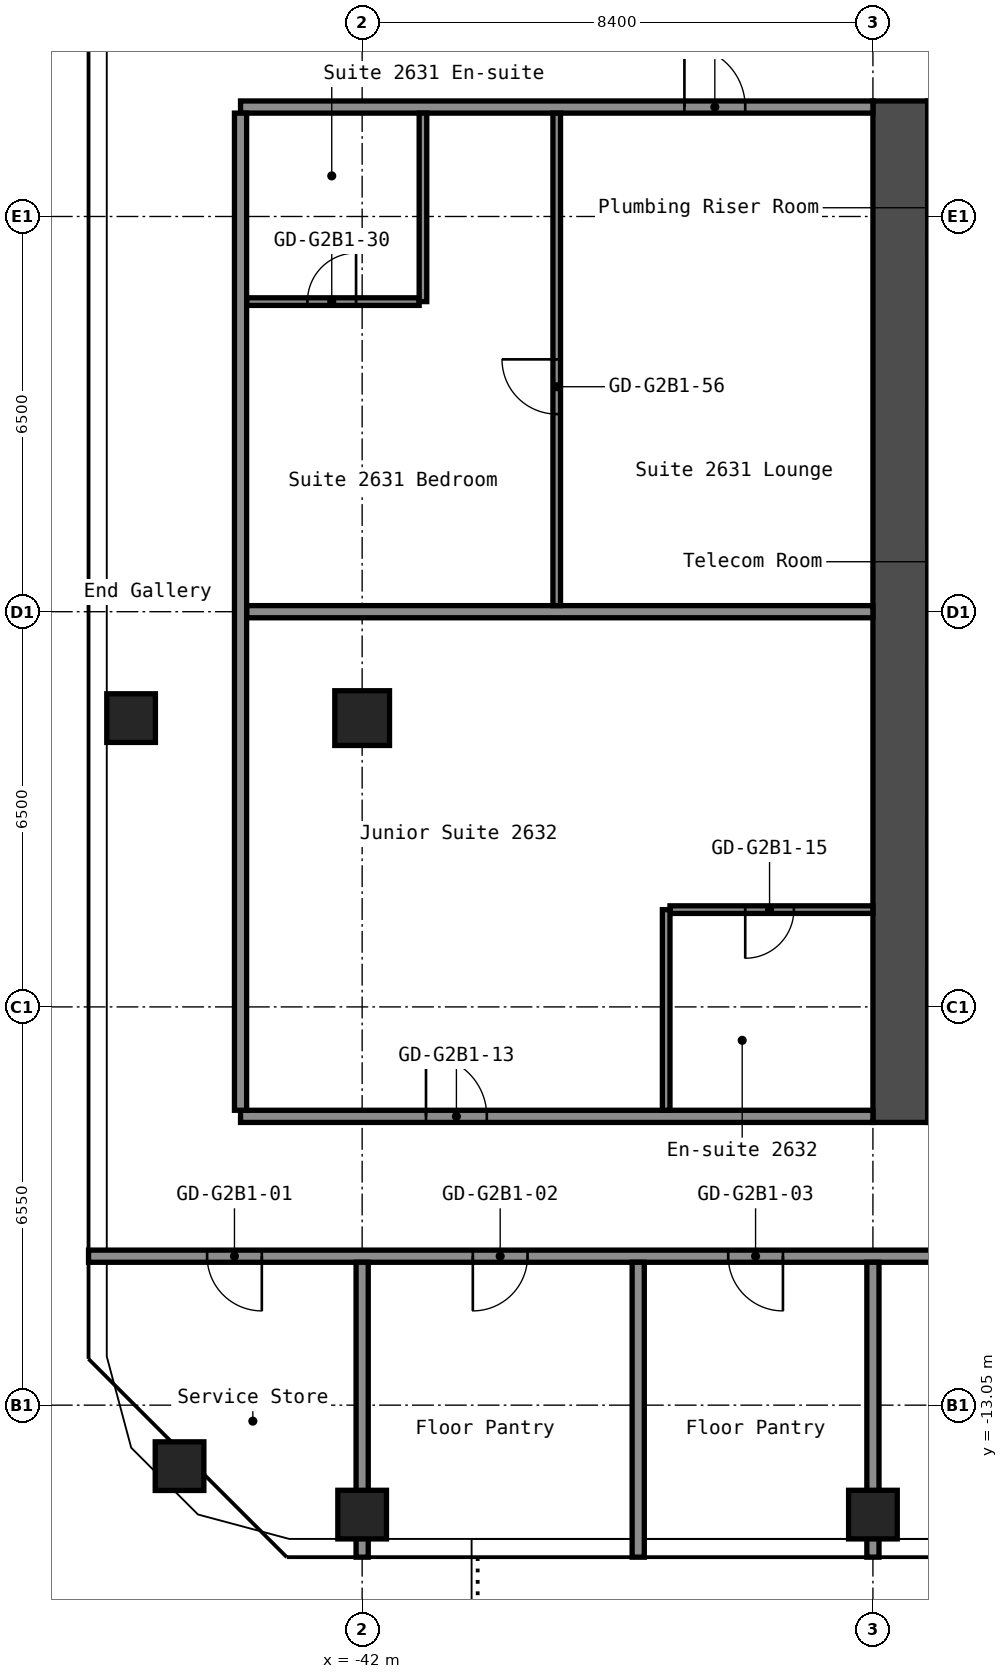
"""IFC4 building model, lengths in metres.
Left out: names, types, materials, properties, quantities, classifications, styles, units other than length and angle.
Written with IfcOpenShell. Run it as: python <this file> out.ifc"""

import sys

from ifc_helpers import new_model, si_unit, direction, frame, frame_2d, origin, origin_2d, place, context, subcontext, project, spatial, rectangle, hollow_rectangle, extrude, element, fill, save


model = new_model("IFC4")
c1 = context("Model", 3, precision=1e-05, world=origin(), true_north=direction((0.0, 1.0)))
c2 = subcontext(c1, "Body", "Model", "MODEL_VIEW")
j1 = project(units=[si_unit("LENGTHUNIT", "METRE"), si_unit("PLANEANGLEUNIT", "RADIAN")], contexts=[c1])
p1 = place(None, origin())
s1 = spatial("IfcSite", under=j1, at=p1, CompositionType="ELEMENT")
p2 = place(p1, origin())
s2 = spatial("IfcBuilding", under=s1, at=p2, CompositionType="ELEMENT")
p3 = place(p2, frame((0.0, 0.0, 94.6)))
s3 = spatial("IfcBuildingStorey", under=s2, at=p3, CompositionType="ELEMENT", Elevation=94.6)
for number, where, z_axis, x_axis in (
    (1, (-45.003, -14.053, 0.0), (0.0, 0.0, 1.0), (1.0, 0.0, 0.0)),
    (2, (-45.8, -1.75, 0.0), (0.0, 0.0, 1.0), (1.0, 0.0, 0.0)),
    (3, (-42.0, -14.85, 0.0), (0.0, 0.0, 1.0), (1.0, 0.0, 0.0)),
):
    element("IfcColumn", number, at=place(p3, frame(where, z_axis=z_axis, x_axis=x_axis)), inside=s3, PredefinedType="COLUMN", context=c2, shape_type="SweptSolid", body=[
        extrude(hollow_rectangle(XDim=0.8, YDim=0.8, WallThickness=0.032, at=origin_2d()), origin(), (0.0, 0.0, 1.0), 2.8),
    ])
p4 = place(p3, frame((-42.0, -1.75, 0.0), z_axis=(0.0, 0.0, 1.0), x_axis=(1.0, 0.0, 0.0)))
e4 = element("IfcColumn", 4, at=p4, inside=s3, PredefinedType="COLUMN", context=c2, shape_type="SweptSolid", body=[
    extrude(hollow_rectangle(XDim=0.9, YDim=0.9, WallThickness=0.036, at=origin_2d()), origin(), (0.0, 0.0, 1.0), 2.8),
])
p5 = place(p3, frame((-33.6, -14.85, 0.0), z_axis=(0.0, 0.0, 1.0), x_axis=(1.0, 0.0, 0.0)))
e5 = element("IfcColumn", 5, at=p5, inside=s3, PredefinedType="COLUMN", context=c2, shape_type="SweptSolid", body=[
    extrude(hollow_rectangle(XDim=0.8, YDim=0.8, WallThickness=0.032, at=origin_2d()), origin(), (0.0, 0.0, 1.0), 2.8),
])
p6 = place(p3, frame((-33.15, -8.4, 0.0), z_axis=(0.0, 0.0, 1.0), x_axis=(0.0, 1.0, 0.0)))
e6 = element("IfcWall", 6, at=p6, inside=s3, PredefinedType="SHEAR", context=c2, shape_type="SweptSolid", body=[
    extrude(rectangle(XDim=16.8, YDim=0.9, at=frame_2d((8.4, 0.0))), origin(), (0.0, 0.0, 1.0), 2.8),
])
p7 = place(p3, frame((-32.7, 1.325, 0.0), z_axis=(0.0, 0.0, 1.0), x_axis=(1.0, 0.0, 0.0)))
e7 = element("IfcWall", 7, at=p7, inside=s3, PredefinedType="SHEAR", context=c2, shape_type="SweptSolid", body=[
    extrude(rectangle(XDim=5.05, YDim=0.25, at=frame_2d((2.525, 0.0))), origin(), (0.0, 0.0, 1.0), 2.8),
])
p8 = place(p7, frame((3.3, 0.0, 0.0)))
e8 = element("IfcOpeningElement", 8, at=p8, cuts=e7, PredefinedType="OPENING", context=c2, shape_type="SweptSolid", body=[
    extrude(rectangle(XDim=1.2, YDim=2.1, at=frame_2d((0.6, 1.05))), frame((0.0, 0.135, 0.0), z_axis=(0.0, -1.0, 0.0), x_axis=(1.0, 0.0, 0.0)), (0.0, 0.0, 1.0), 0.27),
])
p9 = place(p3, frame((-32.7, -3.625, 0.0), z_axis=(0.0, 0.0, 1.0), x_axis=(1.0, 0.0, 0.0)))
e9 = element("IfcWall", 9, at=p9, inside=s3, PredefinedType="SHEAR", context=c2, shape_type="SweptSolid", body=[
    extrude(rectangle(XDim=4.55, YDim=0.25, at=frame_2d((2.275, 0.0))), origin(), (0.0, 0.0, 1.0), 2.8),
])
p10 = place(p9, frame((2.85, 0.0, 0.0)))
e10 = element("IfcOpeningElement", 10, at=p10, cuts=e9, PredefinedType="OPENING", context=c2, shape_type="SweptSolid", body=[
    extrude(rectangle(XDim=1.1, YDim=2.1, at=frame_2d((0.55, 1.05))), frame((0.0, 0.135, 0.0), z_axis=(0.0, -1.0, 0.0), x_axis=(1.0, 0.0, 0.0)), (0.0, 0.0, 1.0), 0.27),
])
p11 = place(p9, frame((0.6, 0.0, 0.0)))
e11 = element("IfcOpeningElement", 11, at=p11, cuts=e9, PredefinedType="OPENING", context=c2, shape_type="SweptSolid", body=[
    extrude(rectangle(XDim=1.1, YDim=2.1, at=frame_2d((0.55, 1.05))), frame((0.0, 0.135, 0.0), z_axis=(0.0, -1.0, 0.0), x_axis=(1.0, 0.0, 0.0)), (0.0, 0.0, 1.0), 0.27),
])
p12 = place(p3, frame((-32.7, -6.75, 0.0), z_axis=(0.0, 0.0, 1.0), x_axis=(1.0, 0.0, 0.0)))
e12 = element("IfcWall", 12, at=p12, inside=s3, PredefinedType="SHEAR", context=c2, shape_type="SweptSolid", body=[
    extrude(rectangle(XDim=4.55, YDim=1.5, at=frame_2d((2.275, 0.0))), origin(), (0.0, 0.0, 1.0), 2.8),
])
p13 = place(p3, frame((-46.5, -10.6, 0.0), z_axis=(0.0, 0.0, 1.0), x_axis=(1.0, 0.0, 0.0)))
e13 = element("IfcWall", 13, at=p13, inside=s3, PredefinedType="PARTITIONING", context=c2, shape_type="SweptSolid", body=[
    extrude(rectangle(XDim=29.7, YDim=0.2, at=frame_2d((14.85, 0.0))), origin(), (0.0, 0.0, 1.0), 2.8),
])
p14 = place(p13, frame((1.95, 0.0, 0.0)))
e14 = element("IfcOpeningElement", 14, at=p14, cuts=e13, PredefinedType="OPENING", context=c2, shape_type="SweptSolid", body=[
    extrude(rectangle(XDim=0.9, YDim=2.1, at=frame_2d((0.45, 1.05))), frame((0.0, 0.11, 0.0), z_axis=(0.0, -1.0, 0.0), x_axis=(1.0, 0.0, 0.0)), (0.0, 0.0, 1.0), 0.22),
])
p15 = place(p13, frame((6.32, 0.0, 0.0)))
e15 = element("IfcOpeningElement", 15, at=p15, cuts=e13, PredefinedType="OPENING", context=c2, shape_type="SweptSolid", body=[
    extrude(rectangle(XDim=0.9, YDim=2.1, at=frame_2d((0.45, 1.05))), frame((0.0, 0.11, 0.0), z_axis=(0.0, -1.0, 0.0), x_axis=(1.0, 0.0, 0.0)), (0.0, 0.0, 1.0), 0.22),
])
p16 = place(p13, frame((10.52, 0.0, 0.0)))
e16 = element("IfcOpeningElement", 16, at=p16, cuts=e13, PredefinedType="OPENING", context=c2, shape_type="SweptSolid", body=[
    extrude(rectangle(XDim=0.9, YDim=2.1, at=frame_2d((0.45, 1.05))), frame((0.0, 0.11, 0.0), z_axis=(0.0, -1.0, 0.0), x_axis=(1.0, 0.0, 0.0)), (0.0, 0.0, 1.0), 0.22),
])
p17 = place(p13, frame((16.6, 0.0, 0.0)))
e17 = element("IfcOpeningElement", 17, at=p17, cuts=e13, PredefinedType="OPENING", context=c2, shape_type="SweptSolid", body=[
    extrude(rectangle(XDim=1.0, YDim=2.1, at=frame_2d((0.5, 1.05))), frame((0.0, 0.11, 0.0), z_axis=(0.0, -1.0, 0.0), x_axis=(1.0, 0.0, 0.0)), (0.0, 0.0, 1.0), 0.22),
])
p18 = place(p13, frame((23.37, 0.0, 0.0)))
e18 = element("IfcOpeningElement", 18, at=p18, cuts=e13, PredefinedType="OPENING", context=c2, shape_type="SweptSolid", body=[
    extrude(rectangle(XDim=0.9, YDim=2.1, at=frame_2d((0.45, 1.05))), frame((0.0, 0.11, 0.0), z_axis=(0.0, -1.0, 0.0), x_axis=(1.0, 0.0, 0.0)), (0.0, 0.0, 1.0), 0.22),
])
p19 = place(p13, frame((27.57, 0.0, 0.0)))
e19 = element("IfcOpeningElement", 19, at=p19, cuts=e13, PredefinedType="OPENING", context=c2, shape_type="SweptSolid", body=[
    extrude(rectangle(XDim=0.9, YDim=2.1, at=frame_2d((0.45, 1.05))), frame((0.0, 0.11, 0.0), z_axis=(0.0, -1.0, 0.0), x_axis=(1.0, 0.0, 0.0)), (0.0, 0.0, 1.0), 0.22),
])
p20 = place(p3, frame((-44.0, -8.3, 0.0), z_axis=(0.0, 0.0, 1.0), x_axis=(1.0, 0.0, 0.0)))
e20 = element("IfcWall", 20, at=p20, inside=s3, PredefinedType="PARTITIONING", context=c2, shape_type="SweptSolid", body=[
    extrude(rectangle(XDim=10.4, YDim=0.2, at=frame_2d((5.2, 0.0))), origin(), (0.0, 0.0, 1.0), 2.8),
])
p21 = place(p20, frame((3.05, 0.0, 0.0)))
e21 = element("IfcOpeningElement", 21, at=p21, cuts=e20, PredefinedType="OPENING", context=c2, shape_type="SweptSolid", body=[
    extrude(rectangle(XDim=1.0, YDim=2.1, at=frame_2d((0.5, 1.05))), frame((0.0, 0.11, 0.0), z_axis=(0.0, -1.0, 0.0), x_axis=(1.0, 0.0, 0.0)), (0.0, 0.0, 1.0), 0.22),
])
p22 = place(p3, frame((-36.938, -4.9, 0.0), z_axis=(0.0, 0.0, 1.0), x_axis=(1.0, 0.0, 0.0)))
e22 = element("IfcWall", 22, at=p22, inside=s3, PredefinedType="PARTITIONING", context=c2, shape_type="SweptSolid", body=[
    extrude(rectangle(XDim=3.337, YDim=0.125, at=frame_2d((1.669, 0.0))), origin(), (0.0, 0.0, 1.0), 2.8),
])
p23 = place(p22, frame((1.238, 0.0, 0.0)))
e23 = element("IfcOpeningElement", 23, at=p23, cuts=e22, PredefinedType="OPENING", context=c2, shape_type="SweptSolid", body=[
    extrude(rectangle(XDim=0.8, YDim=2.1, at=frame_2d((0.4, 1.05))), frame((0.0, 0.073, 0.0), z_axis=(0.0, -1.0, 0.0), x_axis=(1.0, 0.0, 0.0)), (0.0, 0.0, 1.0), 0.145),
])
p24 = place(p3, frame((-43.9, 0.0, 0.0), z_axis=(0.0, 0.0, 1.0), x_axis=(1.0, 0.0, 0.0)))
e24 = element("IfcWall", 24, at=p24, inside=s3, PredefinedType="PARTITIONING", context=c2, shape_type="SweptSolid", body=[
    extrude(rectangle(XDim=10.3, YDim=0.2, at=frame_2d((5.15, 0.0))), origin(), (0.0, 0.0, 1.0), 2.8),
])
p25 = place(p3, frame((-43.9, 5.1, 0.0), z_axis=(0.0, 0.0, 1.0), x_axis=(1.0, 0.0, 0.0)))
e25 = element("IfcWall", 25, at=p25, inside=s3, PredefinedType="PARTITIONING", context=c2, shape_type="SweptSolid", body=[
    extrude(rectangle(XDim=2.837, YDim=0.125, at=frame_2d((1.419, 0.0))), origin(), (0.0, 0.0, 1.0), 2.8),
])
p26 = place(p25, frame((1.0, 0.0, 0.0)))
e26 = element("IfcOpeningElement", 26, at=p26, cuts=e25, PredefinedType="OPENING", context=c2, shape_type="SweptSolid", body=[
    extrude(rectangle(XDim=0.8, YDim=2.1, at=frame_2d((0.4, 1.05))), frame((0.0, 0.073, 0.0), z_axis=(0.0, -1.0, 0.0), x_axis=(1.0, 0.0, 0.0)), (0.0, 0.0, 1.0), 0.145),
])
p27 = place(p3, frame((-44.0, 8.3, 0.0), z_axis=(0.0, 0.0, 1.0), x_axis=(1.0, 0.0, 0.0)))
e27 = element("IfcWall", 27, at=p27, inside=s3, PredefinedType="PARTITIONING", context=c2, shape_type="SweptSolid", body=[
    extrude(rectangle(XDim=10.4, YDim=0.2, at=frame_2d((5.2, 0.0))), origin(), (0.0, 0.0, 1.0), 2.8),
])
p28 = place(p27, frame((7.3, 0.0, 0.0)))
e28 = element("IfcOpeningElement", 28, at=p28, cuts=e27, PredefinedType="OPENING", context=c2, shape_type="SweptSolid", body=[
    extrude(rectangle(XDim=1.0, YDim=2.1, at=frame_2d((0.5, 1.05))), frame((0.0, 0.11, 0.0), z_axis=(0.0, -1.0, 0.0), x_axis=(1.0, 0.0, 0.0)), (0.0, 0.0, 1.0), 0.22),
])
p29 = place(p3, frame((-44.0, -8.2, 0.0), z_axis=(0.0, 0.0, 1.0), x_axis=(0.0, 1.0, 0.0)))
e29 = element("IfcWall", 29, at=p29, inside=s3, PredefinedType="PARTITIONING", context=c2, shape_type="SweptSolid", body=[
    extrude(rectangle(XDim=16.4, YDim=0.2, at=frame_2d((8.2, 0.0))), origin(), (0.0, 0.0, 1.0), 2.8),
])
p30 = place(p3, frame((-42.0, -15.55, 0.0), z_axis=(0.0, 0.0, 1.0), x_axis=(0.0, 1.0, 0.0)))
e30 = element("IfcWall", 30, at=p30, inside=s3, PredefinedType="PARTITIONING", context=c2, shape_type="SweptSolid", body=[
    extrude(rectangle(XDim=4.85, YDim=0.2, at=frame_2d((2.425, 0.0))), origin(), (0.0, 0.0, 1.0), 2.8),
])
p31 = place(p3, frame((-41.0, 5.1, 0.0), z_axis=(0.0, 0.0, 1.0), x_axis=(0.0, 1.0, 0.0)))
e31 = element("IfcWall", 31, at=p31, inside=s3, PredefinedType="PARTITIONING", context=c2, shape_type="SweptSolid", body=[
    extrude(rectangle(XDim=3.1, YDim=0.125, at=frame_2d((1.55, 0.0))), origin(), (0.0, 0.0, 1.0), 2.8),
])
p32 = place(p3, frame((-38.8, 0.1, 0.0), z_axis=(0.0, 0.0, 1.0), x_axis=(0.0, 1.0, 0.0)))
e32 = element("IfcWall", 32, at=p32, inside=s3, PredefinedType="PARTITIONING", context=c2, shape_type="SweptSolid", body=[
    extrude(rectangle(XDim=8.1, YDim=0.125, at=frame_2d((4.05, 0.0))), origin(), (0.0, 0.0, 1.0), 2.8),
])
p33 = place(p32, frame((3.15, 0.0, 0.0)))
e33 = element("IfcOpeningElement", 33, at=p33, cuts=e32, PredefinedType="OPENING", context=c2, shape_type="SweptSolid", body=[
    extrude(rectangle(XDim=0.9, YDim=2.1, at=frame_2d((0.45, 1.05))), frame((0.0, 0.073, 0.0), z_axis=(0.0, -1.0, 0.0), x_axis=(1.0, 0.0, 0.0)), (0.0, 0.0, 1.0), 0.145),
])
p34 = place(p3, frame((-37.46, -15.55, 0.0), z_axis=(0.0, 0.0, 1.0), x_axis=(0.0, 1.0, 0.0)))
e34 = element("IfcWall", 34, at=p34, inside=s3, PredefinedType="PARTITIONING", context=c2, shape_type="SweptSolid", body=[
    extrude(rectangle(XDim=4.85, YDim=0.2, at=frame_2d((2.425, 0.0))), origin(), (0.0, 0.0, 1.0), 2.8),
])
p35 = place(p3, frame((-37.0, -8.2, 0.0), z_axis=(0.0, 0.0, 1.0), x_axis=(0.0, 1.0, 0.0)))
e35 = element("IfcWall", 35, at=p35, inside=s3, PredefinedType="PARTITIONING", context=c2, shape_type="SweptSolid", body=[
    extrude(rectangle(XDim=3.3, YDim=0.125, at=frame_2d((1.65, 0.0))), origin(), (0.0, 0.0, 1.0), 2.8),
])
p36 = place(p3, frame((-33.6, -15.55, 0.0), z_axis=(0.0, 0.0, 1.0), x_axis=(0.0, 1.0, 0.0)))
e36 = element("IfcWall", 36, at=p36, inside=s3, PredefinedType="PARTITIONING", context=c2, shape_type="SweptSolid", body=[
    extrude(rectangle(XDim=4.85, YDim=0.2, at=frame_2d((2.425, 0.0))), origin(), (0.0, 0.0, 1.0), 2.8),
])
p37 = place(p14, origin())
e37 = element("IfcDoor", 37, at=p37, inside=s3, OperationType="SINGLE_SWING_RIGHT", PredefinedType="DOOR", context=c2, shape_type="SweptSolid", body=[
    extrude(rectangle(XDim=0.9, YDim=2.1, at=frame_2d((0.45, 1.05))), frame((0.0, 0.025, 0.0), z_axis=(0.0, -1.0, 0.0), x_axis=(1.0, 0.0, 0.0)), (0.0, 0.0, 1.0), 0.05),
])
fill(e14, e37)
p38 = place(p15, origin())
e38 = element("IfcDoor", 38, at=p38, inside=s3, OperationType="SINGLE_SWING_LEFT", PredefinedType="DOOR", context=c2, shape_type="SweptSolid", body=[
    extrude(rectangle(XDim=0.9, YDim=2.1, at=frame_2d((0.45, 1.05))), frame((0.0, 0.025, 0.0), z_axis=(0.0, -1.0, 0.0), x_axis=(1.0, 0.0, 0.0)), (0.0, 0.0, 1.0), 0.05),
])
fill(e15, e38)
p39 = place(p16, origin())
e39 = element("IfcDoor", 39, at=p39, inside=s3, OperationType="SINGLE_SWING_RIGHT", PredefinedType="DOOR", context=c2, shape_type="SweptSolid", body=[
    extrude(rectangle(XDim=0.9, YDim=2.1, at=frame_2d((0.45, 1.05))), frame((0.0, 0.025, 0.0), z_axis=(0.0, -1.0, 0.0), x_axis=(1.0, 0.0, 0.0)), (0.0, 0.0, 1.0), 0.05),
])
fill(e16, e39)
p40 = place(p21, origin())
e40 = element("IfcDoor", 40, at=p40, inside=s3, OperationType="SINGLE_SWING_RIGHT", PredefinedType="DOOR", context=c2, shape_type="SweptSolid", body=[
    extrude(rectangle(XDim=1.0, YDim=2.1, at=frame_2d((0.5, 1.05))), frame((0.0, 0.025, 0.0), z_axis=(0.0, -1.0, 0.0), x_axis=(1.0, 0.0, 0.0)), (0.0, 0.0, 1.0), 0.05),
])
fill(e21, e40)
p41 = place(p23, origin())
e41 = element("IfcDoor", 41, at=p41, inside=s3, OperationType="SINGLE_SWING_LEFT", PredefinedType="DOOR", context=c2, shape_type="SweptSolid", body=[
    extrude(rectangle(XDim=0.8, YDim=2.1, at=frame_2d((0.4, 1.05))), frame((0.0, 0.025, 0.0), z_axis=(0.0, -1.0, 0.0), x_axis=(1.0, 0.0, 0.0)), (0.0, 0.0, 1.0), 0.05),
])
fill(e23, e41)
p42 = place(p26, origin())
e42 = element("IfcDoor", 42, at=p42, inside=s3, OperationType="SINGLE_SWING_LEFT", PredefinedType="DOOR", context=c2, shape_type="SweptSolid", body=[
    extrude(rectangle(XDim=0.8, YDim=2.1, at=frame_2d((0.4, 1.05))), frame((0.0, 0.025, 0.0), z_axis=(0.0, -1.0, 0.0), x_axis=(1.0, 0.0, 0.0)), (0.0, 0.0, 1.0), 0.05),
])
fill(e26, e42)
p43 = place(p28, origin())
e43 = element("IfcDoor", 43, at=p43, inside=s3, OperationType="SINGLE_SWING_RIGHT", PredefinedType="DOOR", context=c2, shape_type="SweptSolid", body=[
    extrude(rectangle(XDim=1.0, YDim=2.1, at=frame_2d((0.5, 1.05))), frame((0.0, 0.025, 0.0), z_axis=(0.0, -1.0, 0.0), x_axis=(1.0, 0.0, 0.0)), (0.0, 0.0, 1.0), 0.05),
])
fill(e28, e43)
p44 = place(p33, origin())
e44 = element("IfcDoor", 44, at=p44, inside=s3, OperationType="SINGLE_SWING_LEFT", PredefinedType="DOOR", context=c2, shape_type="SweptSolid", body=[
    extrude(rectangle(XDim=0.9, YDim=2.1, at=frame_2d((0.45, 1.05))), frame((0.0, 0.025, 0.0), z_axis=(0.0, -1.0, 0.0), x_axis=(1.0, 0.0, 0.0)), (0.0, 0.0, 1.0), 0.05),
])
fill(e33, e44)
save(model, sys.argv[1])
